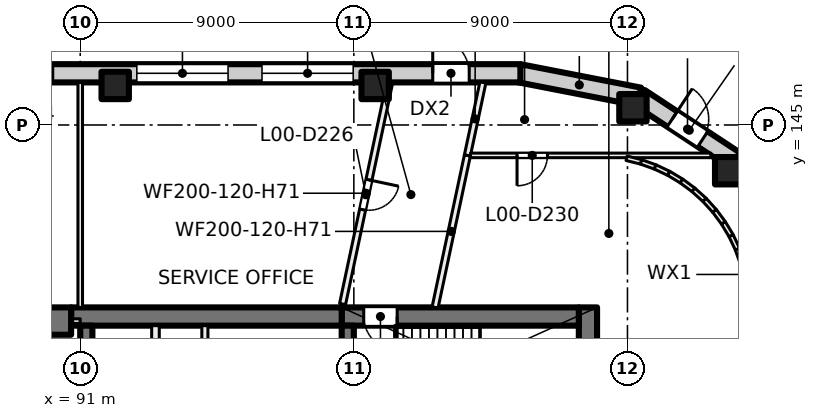
"""IFC4 building model, lengths in metres.
Left out: names, types, materials, properties, quantities, classifications, styles, units other than length and angle.
Written with IfcOpenShell. Run it as: python <this file> out.ifc"""

import sys

from ifc_helpers import new_model, si_unit, direction, frame, frame_2d, origin, origin_2d, place, context, subcontext, project, spatial, rectangle, extrude, element, fill, save


model = new_model("IFC4")
c1 = context("Model", 3, precision=1e-05, world=origin(), true_north=direction((0.0, 1.0)))
c2 = subcontext(c1, "Body", "Model", "MODEL_VIEW")
j1 = project(units=[si_unit("LENGTHUNIT", "METRE"), si_unit("PLANEANGLEUNIT", "RADIAN")], contexts=[c1])
p1 = place(None, origin())
s1 = spatial("IfcSite", under=j1, at=p1, CompositionType="ELEMENT")
p2 = place(p1, origin())
s2 = spatial("IfcBuilding", under=s1, at=p2, CompositionType="ELEMENT")
p3 = place(p2, origin())
s3 = spatial("IfcBuildingStorey", under=s2, at=p3, CompositionType="ELEMENT", Elevation=0.0)
for number, where, z_axis, x_axis in (
    (1, (92.15, 146.3, 0.0), (0.0, 0.0, 1.0), (1.0, 0.0, 0.0)),
    (2, (100.7, 146.3, 0.0), (0.0, 0.0, 1.0), (1.0, 0.0, 0.0)),
    (3, (109.18, 145.567, 0.0), (0.0, 0.0, 1.0), (1.0, 0.0, 0.0)),
    (4, (112.329, 143.496, 0.0), (0.0, 0.0, 1.0), (1.0, 0.0, 0.0)),
    (5, (90.25, 138.55, 0.0), (0.0, 0.0, 1.0), (1.0, 0.0, 0.0)),
):
    element("IfcColumn", number, at=place(p3, frame(where, z_axis=z_axis, x_axis=x_axis)), inside=s3, PredefinedType="COLUMN", context=c2, shape_type="SweptSolid", body=[
        extrude(rectangle(XDim=0.9, YDim=0.9, at=origin_2d()), origin(), (0.0, 0.0, 1.0), 7.5),
    ])
p4 = place(p3, frame((107.7, 139.0, 0.0), z_axis=(0.0, 0.0, 1.0), x_axis=(0.0, -1.0, 0.0)))
e6 = element("IfcWall", 6, at=p4, inside=s3, PredefinedType="SHEAR", context=c2, shape_type="SweptSolid", body=[
    extrude(rectangle(XDim=3.8, YDim=0.6, at=frame_2d((1.9, 0.0))), origin(), (0.0, 0.0, 1.0), 7.5),
])
p5 = place(p3, frame((107.4, 138.7, 0.0), z_axis=(0.0, 0.0, 1.0), x_axis=(-1.0, 0.0, 0.0)))
e7 = element("IfcWall", 7, at=p5, inside=s3, PredefinedType="SHEAR", context=c2, shape_type="SweptSolid", body=[
    extrude(rectangle(XDim=7.8, YDim=0.6, at=frame_2d((3.9, 0.0))), origin(), (0.0, 0.0, 1.0), 7.5),
])
p6 = place(p5, frame((5.975, 0.0, 0.0)))
e8 = element("IfcOpeningElement", 8, at=p6, cuts=e7, PredefinedType="OPENING", context=c2, shape_type="SweptSolid", body=[
    extrude(rectangle(XDim=1.1, YDim=2.1, at=frame_2d((0.55, 1.05))), frame((0.0, 0.31, 0.0), z_axis=(0.0, -1.0, 0.0), x_axis=(1.0, 0.0, 0.0)), (0.0, 0.0, 1.0), 0.62),
])
p7 = place(p3, frame((99.6, 138.7, 0.0), z_axis=(0.0, 0.0, 1.0), x_axis=(-1.0, 0.0, 0.0)))
e9 = element("IfcWall", 9, at=p7, inside=s3, PredefinedType="SHEAR", context=c2, shape_type="SweptSolid", body=[
    extrude(rectangle(XDim=8.9, YDim=0.6, at=frame_2d((4.45, 0.0))), origin(), (0.0, 0.0, 1.0), 7.5),
])
p8 = place(p3, frame((99.8, 138.4, 0.0), z_axis=(0.0, 0.0, 1.0), x_axis=(0.0, -1.0, 0.0)))
e10 = element("IfcWall", 10, at=p8, inside=s3, PredefinedType="SHEAR", context=c2, shape_type="SweptSolid", body=[
    extrude(rectangle(XDim=2.8, YDim=0.4, at=frame_2d((1.4, 0.0))), origin(), (0.0, 0.0, 1.0), 7.5),
])
p9 = place(p8, frame((0.9, 0.0, 0.0)))
e11 = element("IfcOpeningElement", 11, at=p9, cuts=e10, PredefinedType="OPENING", context=c2, shape_type="SweptSolid", body=[
    extrude(rectangle(XDim=1.0, YDim=2.1, at=frame_2d((0.5, 1.05))), frame((0.0, 0.21, 0.0), z_axis=(0.0, -1.0, 0.0), x_axis=(1.0, 0.0, 0.0)), (0.0, 0.0, 1.0), 0.42),
])
p10 = place(p3, frame((91.2, 138.4, 0.0), z_axis=(0.0, 0.0, 1.0), x_axis=(0.0, -1.0, 0.0)))
e12 = element("IfcWall", 12, at=p10, inside=s3, PredefinedType="SHEAR", context=c2, shape_type="SweptSolid", body=[
    extrude(rectangle(XDim=8.6, YDim=0.4, at=frame_2d((4.3, 0.0))), origin(), (0.0, 0.0, 1.0), 7.5),
])
p11 = place(p3, frame((112.661, 143.72, 0.0), z_axis=(0.0, 0.0, 1.0), x_axis=(0.564314082571, -0.825560183277, 0.0)))
e13 = element("IfcWall", 13, at=p11, inside=s3, PredefinedType="SOLIDWALL", context=c2, shape_type="SweptSolid", body=[
    extrude(rectangle(XDim=3.905, YDim=0.6, at=frame_2d((1.953, 0.0))), origin(), (0.0, 0.0, 1.0), 7.1),
])
p12 = place(p11, frame((1.283, 0.0, 0.0)))
e14 = element("IfcOpeningElement", 14, at=p12, cuts=e13, PredefinedType="OPENING", context=c2, shape_type="SweptSolid", body=[
    extrude(rectangle(XDim=1.2, YDim=2.4, at=frame_2d((0.6, 1.2))), frame((0.0, 0.31, 0.0), z_axis=(0.0, -1.0, 0.0), x_axis=(1.0, 0.0, 0.0)), (0.0, 0.0, 1.0), 0.62),
])
p13 = place(p3, frame((109.401, 145.9, 0.0), z_axis=(0.0, 0.0, 1.0), x_axis=(0.835543958523, -0.549423601037, 0.0)))
e15 = element("IfcWall", 15, at=p13, inside=s3, PredefinedType="SOLIDWALL", context=c2, shape_type="SweptSolid", body=[
    extrude(rectangle(XDim=3.906, YDim=0.6, at=frame_2d((1.953, 0.0))), origin(), (0.0, 0.0, 1.0), 7.1),
])
p14 = place(p13, frame((1.283, 0.0, 0.0)))
e16 = element("IfcOpeningElement", 16, at=p14, cuts=e15, PredefinedType="OPENING", context=c2, shape_type="SweptSolid", body=[
    extrude(rectangle(XDim=1.2, YDim=2.4, at=frame_2d((0.6, 1.2))), frame((0.0, 0.31, 0.0), z_axis=(0.0, -1.0, 0.0), x_axis=(1.0, 0.0, 0.0)), (0.0, 0.0, 1.0), 0.62),
])
p15 = place(p3, frame((105.44, 146.702, 0.0), z_axis=(0.0, 0.0, 1.0), x_axis=(0.981593603981, -0.190981665674, 0.0)))
e17 = element("IfcWall", 17, at=p15, inside=s3, PredefinedType="SOLIDWALL", context=c2, shape_type="SweptSolid", body=[
    extrude(rectangle(XDim=4.025, YDim=0.6, at=frame_2d((2.013, 0.0))), origin(), (0.0, 0.0, 1.0), 7.1),
])
p16 = place(p3, frame((46.114, 146.7, 0.0), z_axis=(0.0, 0.0, 1.0), x_axis=(1.0, 0.0, 0.0)))
e18 = element("IfcWall", 18, at=p16, inside=s3, PredefinedType="SOLIDWALL", context=c2, shape_type="SweptSolid", body=[
    extrude(rectangle(XDim=59.364, YDim=0.6, at=frame_2d((29.682, 0.0))), origin(), (0.0, 0.0, 1.0), 7.1),
])
p17 = place(p16, frame((5.35, 0.0, 0.9)))
e19 = element("IfcOpeningElement", 19, at=p17, cuts=e18, PredefinedType="OPENING", context=c2, shape_type="SweptSolid", body=[
    extrude(rectangle(XDim=3.0, YDim=4.2, at=frame_2d((1.5, 2.1))), frame((0.0, 0.31, 0.0), z_axis=(0.0, -1.0, 0.0), x_axis=(1.0, 0.0, 0.0)), (0.0, 0.0, 1.0), 0.62),
])
p18 = place(p16, frame((14.483, 0.0, 0.9)))
e20 = element("IfcOpeningElement", 20, at=p18, cuts=e18, PredefinedType="OPENING", context=c2, shape_type="SweptSolid", body=[
    extrude(rectangle(XDim=3.0, YDim=4.2, at=frame_2d((1.5, 2.1))), frame((0.0, 0.31, 0.0), z_axis=(0.0, -1.0, 0.0), x_axis=(1.0, 0.0, 0.0)), (0.0, 0.0, 1.0), 0.62),
])
p19 = place(p16, frame((21.786, 0.0, 0.9)))
e21 = element("IfcOpeningElement", 21, at=p19, cuts=e18, PredefinedType="OPENING", context=c2, shape_type="SweptSolid", body=[
    extrude(rectangle(XDim=1.2, YDim=4.2, at=frame_2d((0.6, 2.1))), frame((0.0, 0.31, 0.0), z_axis=(0.0, -1.0, 0.0), x_axis=(1.0, 0.0, 0.0)), (0.0, 0.0, 1.0), 0.62),
])
p20 = place(p16, frame((24.516, 0.0, 0.0)))
e22 = element("IfcOpeningElement", 22, at=p20, cuts=e18, PredefinedType="OPENING", context=c2, shape_type="SweptSolid", body=[
    extrude(rectangle(XDim=1.2, YDim=2.4, at=frame_2d((0.6, 1.2))), frame((0.0, 0.31, 0.0), z_axis=(0.0, -1.0, 0.0), x_axis=(1.0, 0.0, 0.0)), (0.0, 0.0, 1.0), 0.62),
])
p21 = place(p16, frame((30.786, 0.0, 0.9)))
e23 = element("IfcOpeningElement", 23, at=p21, cuts=e18, PredefinedType="OPENING", context=c2, shape_type="SweptSolid", body=[
    extrude(rectangle(XDim=1.2, YDim=4.2, at=frame_2d((0.6, 2.1))), frame((0.0, 0.31, 0.0), z_axis=(0.0, -1.0, 0.0), x_axis=(1.0, 0.0, 0.0)), (0.0, 0.0, 1.0), 0.62),
])
p22 = place(p16, frame((32.749, 0.0, 0.0)))
e24 = element("IfcOpeningElement", 24, at=p22, cuts=e18, PredefinedType="OPENING", context=c2, shape_type="SweptSolid", body=[
    extrude(rectangle(XDim=3.0, YDim=3.0, at=frame_2d((1.5, 1.5))), frame((0.0, 0.31, 0.0), z_axis=(0.0, -1.0, 0.0), x_axis=(1.0, 0.0, 0.0)), (0.0, 0.0, 1.0), 0.62),
])
p23 = place(p16, frame((42.781, 0.0, 0.0)))
e25 = element("IfcOpeningElement", 25, at=p23, cuts=e18, PredefinedType="OPENING", context=c2, shape_type="SweptSolid", body=[
    extrude(rectangle(XDim=1.2, YDim=2.1, at=frame_2d((0.6, 1.05))), frame((0.0, 0.31, 0.0), z_axis=(0.0, -1.0, 0.0), x_axis=(1.0, 0.0, 0.0)), (0.0, 0.0, 1.0), 0.62),
])
p24 = place(p16, frame((46.748, 0.0, 0.9)))
e26 = element("IfcOpeningElement", 26, at=p24, cuts=e18, PredefinedType="OPENING", context=c2, shape_type="SweptSolid", body=[
    extrude(rectangle(XDim=3.0, YDim=4.2, at=frame_2d((1.5, 2.1))), frame((0.0, 0.31, 0.0), z_axis=(0.0, -1.0, 0.0), x_axis=(1.0, 0.0, 0.0)), (0.0, 0.0, 1.0), 0.62),
])
p25 = place(p16, frame((50.865, 0.0, 0.9)))
e27 = element("IfcOpeningElement", 27, at=p25, cuts=e18, PredefinedType="OPENING", context=c2, shape_type="SweptSolid", body=[
    extrude(rectangle(XDim=3.0, YDim=4.2, at=frame_2d((1.5, 2.1))), frame((0.0, 0.31, 0.0), z_axis=(0.0, -1.0, 0.0), x_axis=(1.0, 0.0, 0.0)), (0.0, 0.0, 1.0), 0.62),
])
p26 = place(p16, frame((56.481, 0.0, 0.0)))
e28 = element("IfcOpeningElement", 28, at=p26, cuts=e18, PredefinedType="OPENING", context=c2, shape_type="SweptSolid", body=[
    extrude(rectangle(XDim=1.2, YDim=2.4, at=frame_2d((0.6, 1.2))), frame((0.0, 0.31, 0.0), z_axis=(0.0, -1.0, 0.0), x_axis=(1.0, 0.0, 0.0)), (0.0, 0.0, 1.0), 0.62),
])
p27 = place(p3, frame((95.1, 130.0, 0.0), z_axis=(0.0, 0.0, 1.0), x_axis=(0.0, 1.0, 0.0)))
e29 = element("IfcWall", 29, at=p27, inside=s3, PredefinedType="PARTITIONING", context=c2, shape_type="SweptSolid", body=[
    extrude(rectangle(XDim=8.4, YDim=0.2, at=frame_2d((4.2, 0.0))), origin(), (0.0, 0.0, 1.0), 7.1),
])
p28 = place(p27, frame((5.25, 0.0, 0.0)))
e30 = element("IfcOpeningElement", 30, at=p28, cuts=e29, PredefinedType="OPENING", context=c2, shape_type="SweptSolid", body=[
    extrude(rectangle(XDim=1.5, YDim=2.1, at=frame_2d((0.75, 1.05))), frame((0.0, 0.11, 0.0), z_axis=(0.0, -1.0, 0.0), x_axis=(1.0, 0.0, 0.0)), (0.0, 0.0, 1.0), 0.22),
])
p29 = place(p3, frame((93.475, 130.0, 0.0), z_axis=(0.0, 0.0, 1.0), x_axis=(0.0, 1.0, 0.0)))
e31 = element("IfcWall", 31, at=p29, inside=s3, PredefinedType="PARTITIONING", context=c2, shape_type="SweptSolid", body=[
    extrude(rectangle(XDim=8.4, YDim=0.25, at=frame_2d((4.2, 0.0))), origin(), (0.0, 0.0, 1.0), 7.1),
])
p30 = place(p29, frame((2.375, 0.0, 0.0)))
e32 = element("IfcOpeningElement", 32, at=p30, cuts=e31, PredefinedType="OPENING", context=c2, shape_type="SweptSolid", body=[
    extrude(rectangle(XDim=0.8, YDim=2.1, at=frame_2d((0.4, 1.05))), frame((0.0, 0.135, 0.0), z_axis=(0.0, -1.0, 0.0), x_axis=(1.0, 0.0, 0.0)), (0.0, 0.0, 1.0), 0.27),
])
p31 = place(p29, frame((6.625, 0.0, 0.0)))
e33 = element("IfcOpeningElement", 33, at=p31, cuts=e31, PredefinedType="OPENING", context=c2, shape_type="SweptSolid", body=[
    extrude(rectangle(XDim=0.8, YDim=2.1, at=frame_2d((0.4, 1.05))), frame((0.0, 0.135, 0.0), z_axis=(0.0, -1.0, 0.0), x_axis=(1.0, 0.0, 0.0)), (0.0, 0.0, 1.0), 0.27),
])
p32 = place(p3, frame((72.22, 138.55, 0.0), z_axis=(0.0, 0.0, 1.0), x_axis=(1.0, 0.0, 0.0)))
e34 = element("IfcWall", 34, at=p32, inside=s3, PredefinedType="PARTITIONING", context=c2, shape_type="SweptSolid", body=[
    extrude(rectangle(XDim=18.78, YDim=0.15, at=frame_2d((9.39, 0.0))), origin(), (0.0, 0.0, 1.0), 7.1),
])
p33 = place(p32, frame((1.717, 0.0, 0.0)))
e35 = element("IfcOpeningElement", 35, at=p33, cuts=e34, PredefinedType="OPENING", context=c2, shape_type="SweptSolid", body=[
    extrude(rectangle(XDim=1.0, YDim=2.1, at=frame_2d((0.5, 1.05))), frame((0.0, 0.085, 0.0), z_axis=(0.0, -1.0, 0.0), x_axis=(1.0, 0.0, 0.0)), (0.0, 0.0, 1.0), 0.17),
])
p34 = place(p32, frame((11.153, 0.0, 0.0)))
e36 = element("IfcOpeningElement", 36, at=p34, cuts=e34, PredefinedType="OPENING", context=c2, shape_type="SweptSolid", body=[
    extrude(rectangle(XDim=1.0, YDim=2.1, at=frame_2d((0.5, 1.05))), frame((0.0, 0.085, 0.0), z_axis=(0.0, -1.0, 0.0), x_axis=(1.0, 0.0, 0.0)), (0.0, 0.0, 1.0), 0.17),
])
p35 = place(p3, frame((91.0, 139.0, 0.0), z_axis=(0.0, 0.0, 1.0), x_axis=(0.0, 1.0, 0.0)))
e37 = element("IfcWall", 37, at=p35, inside=s3, PredefinedType="PARTITIONING", context=c2, shape_type="SweptSolid", body=[
    extrude(rectangle(XDim=7.4, YDim=0.15, at=frame_2d((3.7, 0.0))), origin(), (0.0, 0.0, 1.0), 7.1),
])
p36 = place(p3, frame((99.629, 139.11, 0.0), z_axis=(0.0, 0.0, 1.0), x_axis=(0.207857580424, 0.978159100689, 0.0)))
e38 = element("IfcWall", 38, at=p36, inside=s3, PredefinedType="PARTITIONING", context=c2, shape_type="SweptSolid", body=[
    extrude(rectangle(XDim=7.453, YDim=0.2, at=frame_2d((3.726, 0.0))), origin(), (0.0, 0.0, 1.0), 7.1),
])
p37 = place(p36, frame((3.176, 0.0, 0.0)))
e39 = element("IfcOpeningElement", 39, at=p37, cuts=e38, PredefinedType="OPENING", context=c2, shape_type="SweptSolid", body=[
    extrude(rectangle(XDim=1.0, YDim=2.1, at=frame_2d((0.5, 1.05))), frame((0.0, 0.11, 0.0), z_axis=(0.0, -1.0, 0.0), x_axis=(1.0, 0.0, 0.0)), (0.0, 0.0, 1.0), 0.22),
])
p38 = place(p3, frame((102.672, 139.0, 0.0), z_axis=(0.0, 0.0, 1.0), x_axis=(0.207950149313, 0.978139425338, 0.0)))
e40 = element("IfcWall", 40, at=p38, inside=s3, PredefinedType="PARTITIONING", context=c2, shape_type="SweptSolid", body=[
    extrude(rectangle(XDim=5.112, YDim=0.2, at=frame_2d((2.556, 0.0))), origin(), (0.0, 0.0, 1.0), 7.1),
])
p39 = place(p3, frame((103.735, 144.0, 0.0), z_axis=(0.0, 0.0, 1.0), x_axis=(0.207870656807, 0.978156321882, 0.0)))
e41 = element("IfcWall", 41, at=p39, inside=s3, PredefinedType="PARTITIONING", context=c2, shape_type="SweptSolid", body=[
    extrude(rectangle(XDim=2.454, YDim=0.2, at=frame_2d((1.227, 0.0))), origin(), (0.0, 0.0, 1.0), 7.1),
])
p40 = place(p3, frame((111.744, 144.0, 0.0), z_axis=(0.0, 0.0, 1.0), x_axis=(-1.0, 0.0, 0.0)))
e42 = element("IfcWall", 42, at=p40, inside=s3, PredefinedType="PARTITIONING", context=c2, shape_type="SweptSolid", body=[
    extrude(rectangle(XDim=7.907, YDim=0.15, at=frame_2d((3.954, 0.0))), origin(), (0.0, 0.0, 1.0), 7.1),
])
p41 = place(p40, frame((5.376, 0.0, 0.0)))
e43 = element("IfcOpeningElement", 43, at=p41, cuts=e42, PredefinedType="OPENING", context=c2, shape_type="SweptSolid", body=[
    extrude(rectangle(XDim=1.0, YDim=2.1, at=frame_2d((0.5, 1.05))), frame((0.0, 0.085, 0.0), z_axis=(0.0, -1.0, 0.0), x_axis=(1.0, 0.0, 0.0)), (0.0, 0.0, 1.0), 0.17),
])
p42 = place(p3, frame((108.971, 143.905, 0.0), z_axis=(0.0, 0.0, 1.0), x_axis=(0.970113715952, -0.242650732785, 0.0)))
e44 = element("IfcWall", 44, at=p42, inside=s3, PredefinedType="PARTITIONING", context=c2, shape_type="SweptSolid", body=[
    extrude(rectangle(XDim=0.499, YDim=0.15, at=frame_2d((0.25, 0.0))), origin(), (0.0, 0.0, 1.0), 7.1),
])
for number, where, z_axis, x_axis in (
    (45, (109.447, 143.786, 0.0), (0.0, 0.0, 1.0), (0.941, -0.337, 0.0)),
    (46, (109.91, 143.621, 0.0), (0.0, 0.0, 1.0), (0.904, -0.428, 0.0)),
):
    element("IfcWall", number, at=place(p3, frame(where, z_axis=z_axis, x_axis=x_axis)), inside=s3, PredefinedType="PARTITIONING", context=c2, shape_type="SweptSolid", body=[
        extrude(rectangle(XDim=0.498, YDim=0.15, at=frame_2d((0.249, 0.0))), origin(), (0.0, 0.0, 1.0), 7.1),
    ])
p43 = place(p3, frame((110.354, 143.412, 0.0), z_axis=(0.0, 0.0, 1.0), x_axis=(0.85671397893, -0.515791778052, 0.0)))
e47 = element("IfcWall", 47, at=p43, inside=s3, PredefinedType="PARTITIONING", context=c2, shape_type="SweptSolid", body=[
    extrude(rectangle(XDim=0.499, YDim=0.15, at=frame_2d((0.249, 0.0))), origin(), (0.0, 0.0, 1.0), 7.1),
])
p44 = place(p3, frame((110.775, 143.159, 0.0), z_axis=(0.0, 0.0, 1.0), x_axis=(0.80404358372, -0.594570362092, 0.0)))
e48 = element("IfcWall", 48, at=p44, inside=s3, PredefinedType="PARTITIONING", context=c2, shape_type="SweptSolid", body=[
    extrude(rectangle(XDim=0.498, YDim=0.15, at=frame_2d((0.249, 0.0))), origin(), (0.0, 0.0, 1.0), 7.1),
])
for number, where, z_axis, x_axis in (
    (49, (111.169, 142.867, 0.0), (0.0, 0.0, 1.0), (0.742, -0.67, 0.0)),
    (50, (111.533, 142.539, 0.0), (0.0, 0.0, 1.0), (0.67, -0.742, 0.0)),
):
    element("IfcWall", number, at=place(p3, frame(where, z_axis=z_axis, x_axis=x_axis)), inside=s3, PredefinedType="PARTITIONING", context=c2, shape_type="SweptSolid", body=[
        extrude(rectangle(XDim=0.499, YDim=0.15, at=frame_2d((0.249, 0.0))), origin(), (0.0, 0.0, 1.0), 7.1),
    ])
p45 = place(p3, frame((111.863, 142.175, 0.0), z_axis=(0.0, 0.0, 1.0), x_axis=(0.594570362092, -0.80404358372, 0.0)))
e51 = element("IfcWall", 51, at=p45, inside=s3, PredefinedType="PARTITIONING", context=c2, shape_type="SweptSolid", body=[
    extrude(rectangle(XDim=0.498, YDim=0.15, at=frame_2d((0.249, 0.0))), origin(), (0.0, 0.0, 1.0), 7.1),
])
p46 = place(p3, frame((112.155, 141.781, 0.0), z_axis=(0.0, 0.0, 1.0), x_axis=(0.515791778052, -0.85671397893, 0.0)))
e52 = element("IfcWall", 52, at=p46, inside=s3, PredefinedType="PARTITIONING", context=c2, shape_type="SweptSolid", body=[
    extrude(rectangle(XDim=0.499, YDim=0.15, at=frame_2d((0.249, 0.0))), origin(), (0.0, 0.0, 1.0), 7.1),
])
for number, where, z_axis, x_axis in (
    (53, (112.408, 141.36, 0.0), (0.0, 0.0, 1.0), (0.428, -0.904, 0.0)),
    (54, (112.618, 140.916, 0.0), (0.0, 0.0, 1.0), (0.337, -0.941, 0.0)),
):
    element("IfcWall", number, at=place(p3, frame(where, z_axis=z_axis, x_axis=x_axis)), inside=s3, PredefinedType="PARTITIONING", context=c2, shape_type="SweptSolid", body=[
        extrude(rectangle(XDim=0.498, YDim=0.15, at=frame_2d((0.249, 0.0))), origin(), (0.0, 0.0, 1.0), 7.1),
    ])
p47 = place(p14, origin())
e55 = element("IfcDoor", 55, at=p47, inside=s3, OperationType="SINGLE_SWING_RIGHT", PredefinedType="DOOR", context=c2, shape_type="SweptSolid", body=[
    extrude(rectangle(XDim=1.2, YDim=2.4, at=frame_2d((0.6, 1.2))), frame((0.0, 0.025, 0.0), z_axis=(0.0, -1.0, 0.0), x_axis=(1.0, 0.0, 0.0)), (0.0, 0.0, 1.0), 0.05),
])
fill(e16, e55)
p48 = place(p23, origin())
e56 = element("IfcDoor", 56, at=p48, inside=s3, OperationType="SINGLE_SWING_RIGHT", PredefinedType="DOOR", context=c2, shape_type="SweptSolid", body=[
    extrude(rectangle(XDim=1.2, YDim=2.1, at=frame_2d((0.6, 1.05))), frame((0.0, 0.025, 0.0), z_axis=(0.0, -1.0, 0.0), x_axis=(1.0, 0.0, 0.0)), (0.0, 0.0, 1.0), 0.05),
])
fill(e25, e56)
p49 = place(p24, origin())
e57 = element("IfcWindow", 57, at=p49, inside=s3, PartitioningType="SINGLE_PANEL", PredefinedType="WINDOW", context=c2, shape_type="SweptSolid", body=[
    extrude(rectangle(XDim=3.0, YDim=4.2, at=frame_2d((1.5, 2.1))), frame((0.0, 0.03, 0.0), z_axis=(0.0, -1.0, 0.0), x_axis=(1.0, 0.0, 0.0)), (0.0, 0.0, 1.0), 0.06),
])
fill(e26, e57)
p50 = place(p25, origin())
e58 = element("IfcWindow", 58, at=p50, inside=s3, PartitioningType="SINGLE_PANEL", PredefinedType="WINDOW", context=c2, shape_type="SweptSolid", body=[
    extrude(rectangle(XDim=3.0, YDim=4.2, at=frame_2d((1.5, 2.1))), frame((0.0, 0.03, 0.0), z_axis=(0.0, -1.0, 0.0), x_axis=(1.0, 0.0, 0.0)), (0.0, 0.0, 1.0), 0.06),
])
fill(e27, e58)
p51 = place(p26, origin())
e59 = element("IfcDoor", 59, at=p51, inside=s3, OperationType="SINGLE_SWING_RIGHT", PredefinedType="DOOR", context=c2, shape_type="SweptSolid", body=[
    extrude(rectangle(XDim=1.2, YDim=2.4, at=frame_2d((0.6, 1.2))), frame((0.0, 0.025, 0.0), z_axis=(0.0, -1.0, 0.0), x_axis=(1.0, 0.0, 0.0)), (0.0, 0.0, 1.0), 0.05),
])
fill(e28, e59)
p52 = place(p6, origin())
e60 = element("IfcDoor", 60, at=p52, inside=s3, OperationType="SINGLE_SWING_LEFT", PredefinedType="DOOR", context=c2, shape_type="SweptSolid", body=[
    extrude(rectangle(XDim=1.1, YDim=2.1, at=frame_2d((0.55, 1.05))), frame((0.0, 0.025, 0.0), z_axis=(0.0, -1.0, 0.0), x_axis=(1.0, 0.0, 0.0)), (0.0, 0.0, 1.0), 0.05),
])
fill(e8, e60)
p53 = place(p37, origin())
e61 = element("IfcDoor", 61, at=p53, inside=s3, OperationType="SINGLE_SWING_RIGHT", PredefinedType="DOOR", context=c2, shape_type="SweptSolid", body=[
    extrude(rectangle(XDim=1.0, YDim=2.1, at=frame_2d((0.5, 1.05))), frame((0.0, 0.025, 0.0), z_axis=(0.0, -1.0, 0.0), x_axis=(1.0, 0.0, 0.0)), (0.0, 0.0, 1.0), 0.05),
])
fill(e39, e61)
p54 = place(p41, origin())
e62 = element("IfcDoor", 62, at=p54, inside=s3, OperationType="SINGLE_SWING_RIGHT", PredefinedType="DOOR", context=c2, shape_type="SweptSolid", body=[
    extrude(rectangle(XDim=1.0, YDim=2.1, at=frame_2d((0.5, 1.05))), frame((0.0, 0.025, 0.0), z_axis=(0.0, -1.0, 0.0), x_axis=(1.0, 0.0, 0.0)), (0.0, 0.0, 1.0), 0.05),
])
fill(e43, e62)
save(model, sys.argv[1])
